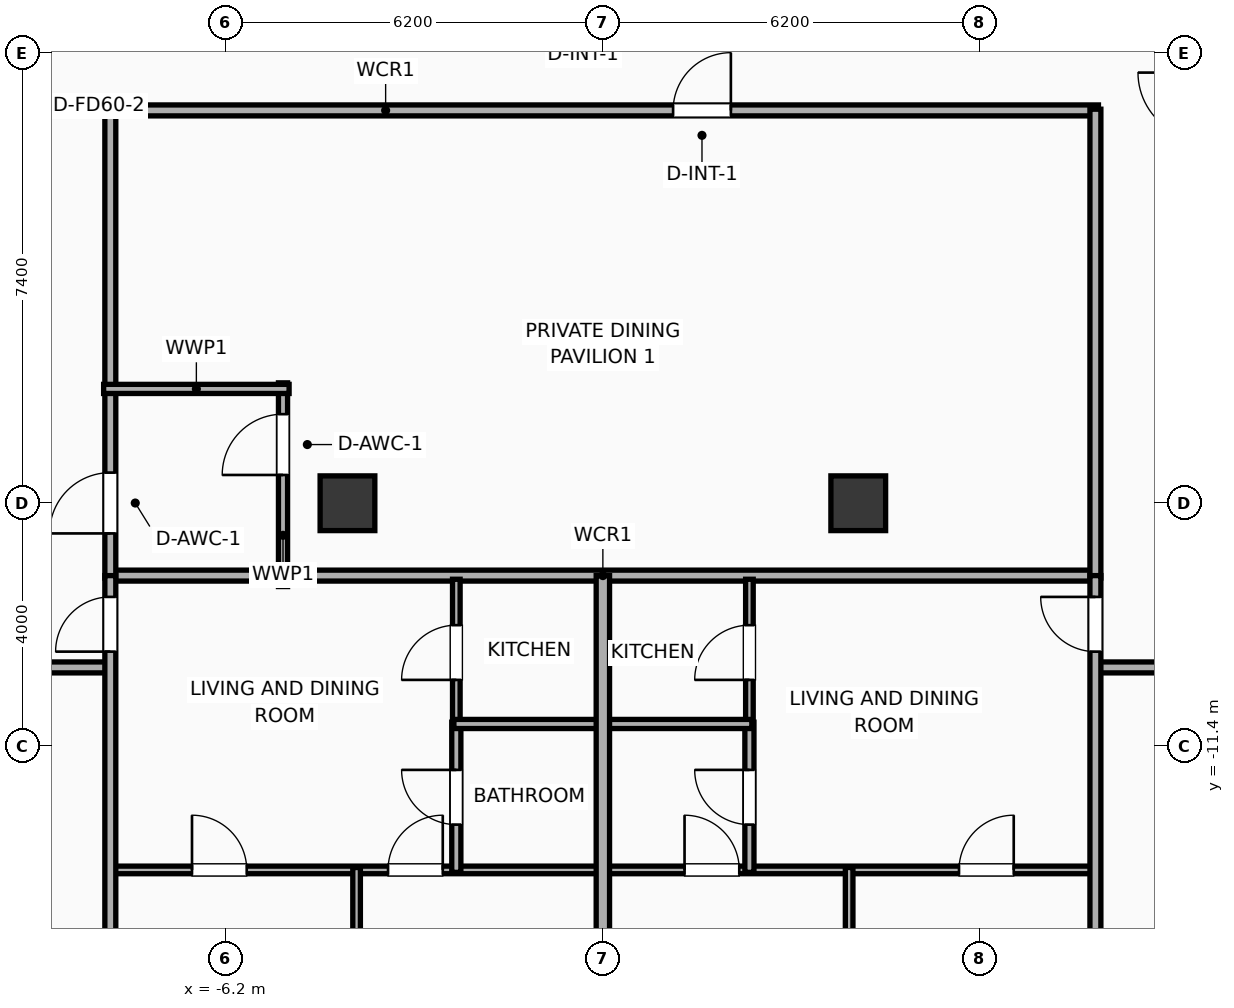
"""IFC4 building model, lengths in metres.
Left out: names, types, materials, properties, quantities, classifications, styles, units other than length and angle.
Written with IfcOpenShell. Run it as: python <this file> out.ifc"""

import sys

from ifc_helpers import new_model, si_unit, direction, frame, frame_2d, origin, origin_2d, place, context, subcontext, project, spatial, rectangle, extrude, element, fill, save


model = new_model("IFC4")
c1 = context("Model", 3, precision=1e-05, world=origin(), true_north=direction((0.0, 1.0)))
c2 = subcontext(c1, "Body", "Model", "MODEL_VIEW")
j1 = project(units=[si_unit("LENGTHUNIT", "METRE"), si_unit("PLANEANGLEUNIT", "RADIAN")], contexts=[c1])
p1 = place(None, origin())
s1 = spatial("IfcSite", under=j1, at=p1, CompositionType="ELEMENT")
p2 = place(p1, origin())
s2 = spatial("IfcBuilding", under=s1, at=p2, CompositionType="ELEMENT")
p3 = place(p2, frame((0.0, 0.0, 144.3)))
s3 = spatial("IfcBuildingStorey", under=s2, at=p3, CompositionType="ELEMENT", Elevation=144.3)
for number, where, z_axis, x_axis in (
    (1, (-4.2, -7.4, 0.0), (0.0, 0.0, 1.0), (1.0, 0.0, 0.0)),
    (2, (4.2, -7.4, 0.0), (0.0, 0.0, 1.0), (1.0, 0.0, 0.0)),
):
    element("IfcColumn", number, at=place(p3, frame(where, z_axis=z_axis, x_axis=x_axis)), inside=s3, PredefinedType="COLUMN", context=c2, shape_type="SweptSolid", body=[
        extrude(rectangle(XDim=0.9, YDim=0.9, at=origin_2d()), origin(), (0.0, 0.0, 1.0), 3.9),
    ])
p4 = place(p3, frame((-8.15, -8.59, 0.0), z_axis=(0.0, 0.0, 1.0), x_axis=(1.0, 0.0, 0.0)))
e3 = element("IfcWall", 3, at=p4, inside=s3, PredefinedType="PARTITIONING", context=c2, shape_type="SweptSolid", body=[
    extrude(rectangle(XDim=16.3, YDim=0.18, at=frame_2d((8.15, 0.0))), origin(), (0.0, 0.0, 1.0), 3.65),
])
p5 = place(p3, frame((-8.15, -0.94, 0.0), z_axis=(0.0, 0.0, 1.0), x_axis=(1.0, 0.0, 0.0)))
e4 = element("IfcWall", 4, at=p5, inside=s3, PredefinedType="PARTITIONING", context=c2, shape_type="SweptSolid", body=[
    extrude(rectangle(XDim=16.3, YDim=0.18, at=frame_2d((8.15, 0.0))), origin(), (0.0, 0.0, 1.0), 3.65),
])
p6 = place(p5, frame((9.305, 0.0, 0.0)))
e5 = element("IfcOpeningElement", 5, at=p6, cuts=e4, PredefinedType="OPENING", context=c2, shape_type="SweptSolid", body=[
    extrude(rectangle(XDim=0.95, YDim=2.05, at=frame_2d((0.475, 1.025))), frame((0.0, 0.1, 0.0), z_axis=(0.0, -1.0, 0.0), x_axis=(1.0, 0.0, 0.0)), (0.0, 0.0, 1.0), 0.2),
])
p7 = place(p3, frame((-8.1, -8.63, 0.0), z_axis=(0.0, 0.0, 1.0), x_axis=(0.0, 1.0, 0.0)))
e6 = element("IfcWall", 6, at=p7, inside=s3, PredefinedType="PARTITIONING", context=c2, shape_type="SweptSolid", body=[
    extrude(rectangle(XDim=7.71, YDim=0.18, at=frame_2d((3.855, 0.0))), origin(), (0.0, 0.0, 1.0), 3.65),
])
p8 = place(p7, frame((0.734, 0.0, 0.0)))
e7 = element("IfcOpeningElement", 7, at=p8, cuts=e6, PredefinedType="OPENING", context=c2, shape_type="SweptSolid", body=[
    extrude(rectangle(XDim=1.0, YDim=2.05, at=frame_2d((0.5, 1.025))), frame((0.0, 0.1, 0.0), z_axis=(0.0, -1.0, 0.0), x_axis=(1.0, 0.0, 0.0)), (0.0, 0.0, 1.0), 0.2),
])
p9 = place(p3, frame((8.1, -8.63, 0.0), z_axis=(0.0, 0.0, 1.0), x_axis=(0.0, 1.0, 0.0)))
e8 = element("IfcWall", 8, at=p9, inside=s3, PredefinedType="PARTITIONING", context=c2, shape_type="SweptSolid", body=[
    extrude(rectangle(XDim=7.71, YDim=0.18, at=frame_2d((3.855, 0.0))), origin(), (0.0, 0.0, 1.0), 3.65),
])
p10 = place(p3, frame((-5.26, -8.77, 0.0), z_axis=(0.0, 0.0, 1.0), x_axis=(0.0, 1.0, 0.0)))
e9 = element("IfcWall", 9, at=p10, inside=s3, PredefinedType="PLUMBINGWALL", context=c2, shape_type="SweptSolid", body=[
    extrude(rectangle(XDim=3.35, YDim=0.15, at=frame_2d((1.675, 0.0))), origin(), (0.0, 0.0, 1.0), 3.65),
])
p11 = place(p10, frame((1.835, 0.0, 0.0)))
e10 = element("IfcOpeningElement", 10, at=p11, cuts=e9, PredefinedType="OPENING", context=c2, shape_type="SweptSolid", body=[
    extrude(rectangle(XDim=1.0, YDim=2.05, at=frame_2d((0.5, 1.025))), frame((0.0, 0.085, 0.0), z_axis=(0.0, -1.0, 0.0), x_axis=(1.0, 0.0, 0.0)), (0.0, 0.0, 1.0), 0.17),
])
p12 = place(p3, frame((-8.21, -5.52, 0.0), z_axis=(0.0, 0.0, 1.0), x_axis=(1.0, 0.0, 0.0)))
e11 = element("IfcWall", 11, at=p12, inside=s3, PredefinedType="PLUMBINGWALL", context=c2, shape_type="SweptSolid", body=[
    extrude(rectangle(XDim=3.05, YDim=0.15, at=frame_2d((1.525, 0.0))), origin(), (0.0, 0.0, 1.0), 3.65),
])
p13 = place(p3, frame((-19.5, -10.1, 0.0), z_axis=(0.0, 0.0, 1.0), x_axis=(1.0, 0.0, 0.0)))
e12 = element("IfcWall", 12, at=p13, inside=s3, PredefinedType="PARTITIONING", context=c2, shape_type="SweptSolid", body=[
    extrude(rectangle(XDim=11.42, YDim=0.18, at=frame_2d((5.71, 0.0))), origin(), (0.0, 0.0, 1.0), 3.65),
])
p14 = place(p13, frame((2.623, 0.0, 0.0)))
e13 = element("IfcOpeningElement", 13, at=p14, cuts=e12, PredefinedType="OPENING", context=c2, shape_type="SweptSolid", body=[
    extrude(rectangle(XDim=0.9, YDim=2.05, at=frame_2d((0.45, 1.025))), frame((0.0, 0.1, 0.0), z_axis=(0.0, -1.0, 0.0), x_axis=(1.0, 0.0, 0.0)), (0.0, 0.0, 1.0), 0.2),
])
p15 = place(p13, frame((9.189, 0.0, 0.0)))
e14 = element("IfcOpeningElement", 14, at=p15, cuts=e12, PredefinedType="OPENING", context=c2, shape_type="SweptSolid", body=[
    extrude(rectangle(XDim=1.15, YDim=2.05, at=frame_2d((0.575, 1.025))), frame((0.0, 0.1, 0.0), z_axis=(0.0, -1.0, 0.0), x_axis=(1.0, 0.0, 0.0)), (0.0, 0.0, 1.0), 0.2),
])
p16 = place(p3, frame((8.08, -10.1, 0.0), z_axis=(0.0, 0.0, 1.0), x_axis=(1.0, 0.0, 0.0)))
e15 = element("IfcWall", 15, at=p16, inside=s3, PredefinedType="PARTITIONING", context=c2, shape_type="SweptSolid", body=[
    extrude(rectangle(XDim=11.42, YDim=0.18, at=frame_2d((5.71, 0.0))), origin(), (0.0, 0.0, 1.0), 3.65),
])
p17 = place(p16, frame((1.175, 0.0, 0.0)))
e16 = element("IfcOpeningElement", 16, at=p17, cuts=e15, PredefinedType="OPENING", context=c2, shape_type="SweptSolid", body=[
    extrude(rectangle(XDim=1.15, YDim=2.05, at=frame_2d((0.575, 1.025))), frame((0.0, 0.1, 0.0), z_axis=(0.0, -1.0, 0.0), x_axis=(1.0, 0.0, 0.0)), (0.0, 0.0, 1.0), 0.2),
])
p18 = place(p16, frame((6.87, 0.0, 0.0)))
e17 = element("IfcOpeningElement", 17, at=p18, cuts=e15, PredefinedType="OPENING", context=c2, shape_type="SweptSolid", body=[
    extrude(rectangle(XDim=1.15, YDim=2.05, at=frame_2d((0.575, 1.025))), frame((0.0, 0.1, 0.0), z_axis=(0.0, -1.0, 0.0), x_axis=(1.0, 0.0, 0.0)), (0.0, 0.0, 1.0), 0.2),
])
p19 = place(p3, frame((-8.08, -13.43, 0.0), z_axis=(0.0, 0.0, 1.0), x_axis=(1.0, 0.0, 0.0)))
e18 = element("IfcWall", 18, at=p19, inside=s3, PredefinedType="PARTITIONING", context=c2, shape_type="SweptSolid", body=[
    extrude(rectangle(XDim=8.06, YDim=0.125, at=frame_2d((4.03, 0.0))), origin(), (0.0, 0.0, 1.0), 3.65),
])
p20 = place(p19, frame((1.323, 0.0, 0.0)))
e19 = element("IfcOpeningElement", 19, at=p20, cuts=e18, PredefinedType="OPENING", context=c2, shape_type="SweptSolid", body=[
    extrude(rectangle(XDim=0.9, YDim=2.05, at=frame_2d((0.45, 1.025))), frame((0.0, 0.073, 0.0), z_axis=(0.0, -1.0, 0.0), x_axis=(1.0, 0.0, 0.0)), (0.0, 0.0, 1.0), 0.145),
])
p21 = place(p19, frame((4.547, 0.0, 0.0)))
e20 = element("IfcOpeningElement", 20, at=p21, cuts=e18, PredefinedType="OPENING", context=c2, shape_type="SweptSolid", body=[
    extrude(rectangle(XDim=0.9, YDim=2.05, at=frame_2d((0.45, 1.025))), frame((0.0, 0.073, 0.0), z_axis=(0.0, -1.0, 0.0), x_axis=(1.0, 0.0, 0.0)), (0.0, 0.0, 1.0), 0.145),
])
p22 = place(p3, frame((-2.41, -11.06, 0.0), z_axis=(0.0, 0.0, 1.0), x_axis=(0.0, 1.0, 0.0)))
e21 = element("IfcWall", 21, at=p22, inside=s3, PredefinedType="PARTITIONING", context=c2, shape_type="SweptSolid", body=[
    extrude(rectangle(XDim=2.41, YDim=0.125, at=frame_2d((1.205, 0.0))), origin(), (0.0, 0.0, 1.0), 3.65),
])
p23 = place(p22, frame((0.755, 0.0, 0.0)))
e22 = element("IfcOpeningElement", 22, at=p23, cuts=e21, PredefinedType="OPENING", context=c2, shape_type="SweptSolid", body=[
    extrude(rectangle(XDim=0.9, YDim=2.05, at=frame_2d((0.45, 1.025))), frame((0.0, 0.073, 0.0), z_axis=(0.0, -1.0, 0.0), x_axis=(1.0, 0.0, 0.0)), (0.0, 0.0, 1.0), 0.145),
])
p24 = place(p3, frame((-2.41, -13.47, 0.0), z_axis=(0.0, 0.0, 1.0), x_axis=(0.0, 1.0, 0.0)))
e23 = element("IfcWall", 23, at=p24, inside=s3, PredefinedType="PLUMBINGWALL", context=c2, shape_type="SweptSolid", body=[
    extrude(rectangle(XDim=2.47, YDim=0.15, at=frame_2d((1.235, 0.0))), origin(), (0.0, 0.0, 1.0), 3.65),
])
p25 = place(p24, frame((0.785, 0.0, 0.0)))
e24 = element("IfcOpeningElement", 24, at=p25, cuts=e23, PredefinedType="OPENING", context=c2, shape_type="SweptSolid", body=[
    extrude(rectangle(XDim=0.9, YDim=2.05, at=frame_2d((0.45, 1.025))), frame((0.0, 0.085, 0.0), z_axis=(0.0, -1.0, 0.0), x_axis=(1.0, 0.0, 0.0)), (0.0, 0.0, 1.0), 0.17),
])
p26 = place(p3, frame((-2.45, -11.03, 0.0), z_axis=(0.0, 0.0, 1.0), x_axis=(1.0, 0.0, 0.0)))
e25 = element("IfcWall", 25, at=p26, inside=s3, PredefinedType="PLUMBINGWALL", context=c2, shape_type="SweptSolid", body=[
    extrude(rectangle(XDim=2.43, YDim=0.15, at=frame_2d((1.215, 0.0))), origin(), (0.0, 0.0, 1.0), 3.65),
])
p27 = place(p3, frame((-4.05, -21.031, 0.0), z_axis=(0.0, 0.0, 1.0), x_axis=(0.0, 1.0, 0.0)))
e26 = element("IfcWall", 26, at=p27, inside=s3, PredefinedType="PARTITIONING", context=c2, shape_type="SweptSolid", body=[
    extrude(rectangle(XDim=7.641, YDim=0.125, at=frame_2d((3.82, 0.0))), origin(), (0.0, 0.0, 1.0), 3.65),
])
p28 = place(p3, frame((-8.1, -21.456, 0.0), z_axis=(0.0, 0.0, 1.0), x_axis=(0.0, 1.0, 0.0)))
e27 = element("IfcWall", 27, at=p28, inside=s3, PredefinedType="PARTITIONING", context=c2, shape_type="SweptSolid", body=[
    extrude(rectangle(XDim=12.866, YDim=0.18, at=frame_2d((6.433, 0.0))), origin(), (0.0, 0.0, 1.0), 3.65),
])
p29 = place(p28, frame((11.616, 0.0, 0.0)))
e28 = element("IfcOpeningElement", 28, at=p29, cuts=e27, PredefinedType="OPENING", context=c2, shape_type="SweptSolid", body=[
    extrude(rectangle(XDim=0.9, YDim=2.05, at=frame_2d((0.45, 1.025))), frame((0.0, 0.1, 0.0), z_axis=(0.0, -1.0, 0.0), x_axis=(1.0, 0.0, 0.0)), (0.0, 0.0, 1.0), 0.2),
])
p30 = place(p3, frame((0.02, -13.43, 0.0), z_axis=(0.0, 0.0, 1.0), x_axis=(1.0, 0.0, 0.0)))
e29 = element("IfcWall", 29, at=p30, inside=s3, PredefinedType="PARTITIONING", context=c2, shape_type="SweptSolid", body=[
    extrude(rectangle(XDim=8.06, YDim=0.125, at=frame_2d((4.03, 0.0))), origin(), (0.0, 0.0, 1.0), 3.65),
])
p31 = place(p30, frame((1.323, 0.0, 0.0)))
e30 = element("IfcOpeningElement", 30, at=p31, cuts=e29, PredefinedType="OPENING", context=c2, shape_type="SweptSolid", body=[
    extrude(rectangle(XDim=0.9, YDim=2.05, at=frame_2d((0.45, 1.025))), frame((0.0, 0.073, 0.0), z_axis=(0.0, -1.0, 0.0), x_axis=(1.0, 0.0, 0.0)), (0.0, 0.0, 1.0), 0.145),
])
p32 = place(p30, frame((5.837, 0.0, 0.0)))
e31 = element("IfcOpeningElement", 31, at=p32, cuts=e29, PredefinedType="OPENING", context=c2, shape_type="SweptSolid", body=[
    extrude(rectangle(XDim=0.9, YDim=2.05, at=frame_2d((0.45, 1.025))), frame((0.0, 0.073, 0.0), z_axis=(0.0, -1.0, 0.0), x_axis=(1.0, 0.0, 0.0)), (0.0, 0.0, 1.0), 0.145),
])
p33 = place(p3, frame((2.41, -11.06, 0.0), z_axis=(0.0, 0.0, 1.0), x_axis=(0.0, 1.0, 0.0)))
e32 = element("IfcWall", 32, at=p33, inside=s3, PredefinedType="PARTITIONING", context=c2, shape_type="SweptSolid", body=[
    extrude(rectangle(XDim=2.41, YDim=0.125, at=frame_2d((1.205, 0.0))), origin(), (0.0, 0.0, 1.0), 3.65),
])
p34 = place(p33, frame((0.755, 0.0, 0.0)))
e33 = element("IfcOpeningElement", 33, at=p34, cuts=e32, PredefinedType="OPENING", context=c2, shape_type="SweptSolid", body=[
    extrude(rectangle(XDim=0.9, YDim=2.05, at=frame_2d((0.45, 1.025))), frame((0.0, 0.073, 0.0), z_axis=(0.0, -1.0, 0.0), x_axis=(1.0, 0.0, 0.0)), (0.0, 0.0, 1.0), 0.145),
])
p35 = place(p3, frame((2.41, -13.47, 0.0), z_axis=(0.0, 0.0, 1.0), x_axis=(0.0, 1.0, 0.0)))
e34 = element("IfcWall", 34, at=p35, inside=s3, PredefinedType="PLUMBINGWALL", context=c2, shape_type="SweptSolid", body=[
    extrude(rectangle(XDim=2.47, YDim=0.15, at=frame_2d((1.235, 0.0))), origin(), (0.0, 0.0, 1.0), 3.65),
])
p36 = place(p35, frame((0.785, 0.0, 0.0)))
e35 = element("IfcOpeningElement", 35, at=p36, cuts=e34, PredefinedType="OPENING", context=c2, shape_type="SweptSolid", body=[
    extrude(rectangle(XDim=0.9, YDim=2.05, at=frame_2d((0.45, 1.025))), frame((0.0, 0.085, 0.0), z_axis=(0.0, -1.0, 0.0), x_axis=(1.0, 0.0, 0.0)), (0.0, 0.0, 1.0), 0.17),
])
p37 = place(p3, frame((0.02, -11.03, 0.0), z_axis=(0.0, 0.0, 1.0), x_axis=(1.0, 0.0, 0.0)))
e36 = element("IfcWall", 36, at=p37, inside=s3, PredefinedType="PLUMBINGWALL", context=c2, shape_type="SweptSolid", body=[
    extrude(rectangle(XDim=2.43, YDim=0.15, at=frame_2d((1.215, 0.0))), origin(), (0.0, 0.0, 1.0), 3.65),
])
p38 = place(p3, frame((4.05, -20.179, 0.0), z_axis=(0.0, 0.0, 1.0), x_axis=(0.0, 1.0, 0.0)))
e37 = element("IfcWall", 37, at=p38, inside=s3, PredefinedType="PARTITIONING", context=c2, shape_type="SweptSolid", body=[
    extrude(rectangle(XDim=6.79, YDim=0.125, at=frame_2d((3.395, 0.0))), origin(), (0.0, 0.0, 1.0), 2.54),
])
p39 = place(p3, frame((8.1, -19.754, 0.0), z_axis=(0.0, 0.0, 1.0), x_axis=(0.0, 1.0, 0.0)))
e38 = element("IfcWall", 38, at=p39, inside=s3, PredefinedType="PARTITIONING", context=c2, shape_type="SweptSolid", body=[
    extrude(rectangle(XDim=11.164, YDim=0.18, at=frame_2d((5.582, 0.0))), origin(), (0.0, 0.0, 1.0), 3.65),
])
p40 = place(p39, frame((9.913, 0.0, 0.0)))
e39 = element("IfcOpeningElement", 39, at=p40, cuts=e38, PredefinedType="OPENING", context=c2, shape_type="SweptSolid", body=[
    extrude(rectangle(XDim=0.9, YDim=2.05, at=frame_2d((0.45, 1.025))), frame((0.0, 0.1, 0.0), z_axis=(0.0, -1.0, 0.0), x_axis=(1.0, 0.0, 0.0)), (0.0, 0.0, 1.0), 0.2),
])
p41 = place(p3, frame((0.0, -20.605, 0.0), z_axis=(0.0, 0.0, 1.0), x_axis=(0.0, 1.0, 0.0)))
e40 = element("IfcWall", 40, at=p41, inside=s3, PredefinedType="PARTITIONING", context=c2, shape_type="SweptSolid", body=[
    extrude(rectangle(XDim=12.015, YDim=0.22, at=frame_2d((6.007, 0.0))), origin(), (0.0, 0.0, 1.0), 3.65),
])
p42 = place(p6, origin())
e41 = element("IfcDoor", 41, at=p42, inside=s3, OperationType="SINGLE_SWING_RIGHT", PredefinedType="DOOR", context=c2, shape_type="SweptSolid", body=[
    extrude(rectangle(XDim=0.95, YDim=2.05, at=frame_2d((0.475, 1.025))), frame((0.0, 0.025, 0.0), z_axis=(0.0, -1.0, 0.0), x_axis=(1.0, 0.0, 0.0)), (0.0, 0.0, 1.0), 0.05),
])
fill(e5, e41)
p43 = place(p8, origin())
e42 = element("IfcDoor", 42, at=p43, inside=s3, OperationType="SINGLE_SWING_LEFT", PredefinedType="DOOR", context=c2, shape_type="SweptSolid", body=[
    extrude(rectangle(XDim=1.0, YDim=2.05, at=frame_2d((0.5, 1.025))), frame((0.0, 0.025, 0.0), z_axis=(0.0, -1.0, 0.0), x_axis=(1.0, 0.0, 0.0)), (0.0, 0.0, 1.0), 0.05),
])
fill(e7, e42)
p44 = place(p11, origin())
e43 = element("IfcDoor", 43, at=p44, inside=s3, OperationType="SINGLE_SWING_LEFT", PredefinedType="DOOR", context=c2, shape_type="SweptSolid", body=[
    extrude(rectangle(XDim=1.0, YDim=2.05, at=frame_2d((0.5, 1.025))), frame((0.0, 0.025, 0.0), z_axis=(0.0, -1.0, 0.0), x_axis=(1.0, 0.0, 0.0)), (0.0, 0.0, 1.0), 0.05),
])
fill(e10, e43)
p45 = place(p20, origin())
e44 = element("IfcDoor", 44, at=p45, inside=s3, OperationType="SINGLE_SWING_LEFT", PredefinedType="DOOR", context=c2, shape_type="SweptSolid", body=[
    extrude(rectangle(XDim=0.9, YDim=2.05, at=frame_2d((0.45, 1.025))), frame((0.0, 0.025, 0.0), z_axis=(0.0, -1.0, 0.0), x_axis=(1.0, 0.0, 0.0)), (0.0, 0.0, 1.0), 0.05),
])
fill(e19, e44)
p46 = place(p21, origin())
e45 = element("IfcDoor", 45, at=p46, inside=s3, OperationType="SINGLE_SWING_RIGHT", PredefinedType="DOOR", context=c2, shape_type="SweptSolid", body=[
    extrude(rectangle(XDim=0.9, YDim=2.05, at=frame_2d((0.45, 1.025))), frame((0.0, 0.025, 0.0), z_axis=(0.0, -1.0, 0.0), x_axis=(1.0, 0.0, 0.0)), (0.0, 0.0, 1.0), 0.05),
])
fill(e20, e45)
p47 = place(p23, origin())
e46 = element("IfcDoor", 46, at=p47, inside=s3, OperationType="SINGLE_SWING_LEFT", PredefinedType="DOOR", context=c2, shape_type="SweptSolid", body=[
    extrude(rectangle(XDim=0.9, YDim=2.05, at=frame_2d((0.45, 1.025))), frame((0.0, 0.025, 0.0), z_axis=(0.0, -1.0, 0.0), x_axis=(1.0, 0.0, 0.0)), (0.0, 0.0, 1.0), 0.05),
])
fill(e22, e46)
p48 = place(p25, origin())
e47 = element("IfcDoor", 47, at=p48, inside=s3, OperationType="SINGLE_SWING_RIGHT", PredefinedType="DOOR", context=c2, shape_type="SweptSolid", body=[
    extrude(rectangle(XDim=0.9, YDim=2.05, at=frame_2d((0.45, 1.025))), frame((0.0, 0.025, 0.0), z_axis=(0.0, -1.0, 0.0), x_axis=(1.0, 0.0, 0.0)), (0.0, 0.0, 1.0), 0.05),
])
fill(e24, e47)
p49 = place(p29, origin())
e48 = element("IfcDoor", 48, at=p49, inside=s3, OperationType="SINGLE_SWING_LEFT", PredefinedType="DOOR", context=c2, shape_type="SweptSolid", body=[
    extrude(rectangle(XDim=0.9, YDim=2.05, at=frame_2d((0.45, 1.025))), frame((0.0, 0.025, 0.0), z_axis=(0.0, -1.0, 0.0), x_axis=(1.0, 0.0, 0.0)), (0.0, 0.0, 1.0), 0.05),
])
fill(e28, e48)
p50 = place(p31, origin())
e49 = element("IfcDoor", 49, at=p50, inside=s3, OperationType="SINGLE_SWING_LEFT", PredefinedType="DOOR", context=c2, shape_type="SweptSolid", body=[
    extrude(rectangle(XDim=0.9, YDim=2.05, at=frame_2d((0.45, 1.025))), frame((0.0, 0.025, 0.0), z_axis=(0.0, -1.0, 0.0), x_axis=(1.0, 0.0, 0.0)), (0.0, 0.0, 1.0), 0.05),
])
fill(e30, e49)
p51 = place(p32, origin())
e50 = element("IfcDoor", 50, at=p51, inside=s3, OperationType="SINGLE_SWING_RIGHT", PredefinedType="DOOR", context=c2, shape_type="SweptSolid", body=[
    extrude(rectangle(XDim=0.9, YDim=2.05, at=frame_2d((0.45, 1.025))), frame((0.0, 0.025, 0.0), z_axis=(0.0, -1.0, 0.0), x_axis=(1.0, 0.0, 0.0)), (0.0, 0.0, 1.0), 0.05),
])
fill(e31, e50)
p52 = place(p34, origin())
e51 = element("IfcDoor", 51, at=p52, inside=s3, OperationType="SINGLE_SWING_LEFT", PredefinedType="DOOR", context=c2, shape_type="SweptSolid", body=[
    extrude(rectangle(XDim=0.9, YDim=2.05, at=frame_2d((0.45, 1.025))), frame((0.0, 0.025, 0.0), z_axis=(0.0, -1.0, 0.0), x_axis=(1.0, 0.0, 0.0)), (0.0, 0.0, 1.0), 0.05),
])
fill(e33, e51)
p53 = place(p36, origin())
e52 = element("IfcDoor", 52, at=p53, inside=s3, OperationType="SINGLE_SWING_RIGHT", PredefinedType="DOOR", context=c2, shape_type="SweptSolid", body=[
    extrude(rectangle(XDim=0.9, YDim=2.05, at=frame_2d((0.45, 1.025))), frame((0.0, 0.025, 0.0), z_axis=(0.0, -1.0, 0.0), x_axis=(1.0, 0.0, 0.0)), (0.0, 0.0, 1.0), 0.05),
])
fill(e35, e52)
p54 = place(p40, origin())
e53 = element("IfcDoor", 53, at=p54, inside=s3, OperationType="SINGLE_SWING_RIGHT", PredefinedType="DOOR", context=c2, shape_type="SweptSolid", body=[
    extrude(rectangle(XDim=0.9, YDim=2.05, at=frame_2d((0.45, 1.025))), frame((0.0, 0.025, 0.0), z_axis=(0.0, -1.0, 0.0), x_axis=(1.0, 0.0, 0.0)), (0.0, 0.0, 1.0), 0.05),
])
fill(e39, e53)
save(model, sys.argv[1])
